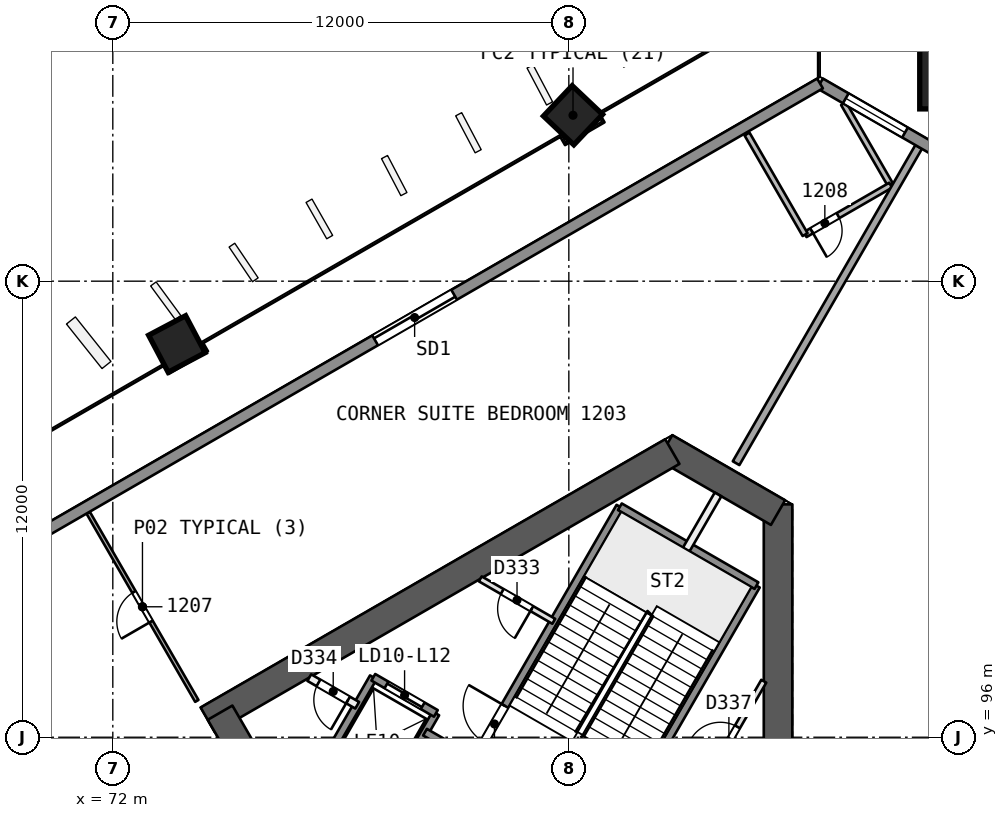
"""IFC4 building model, lengths in metres.
Left out: names, types, materials, properties, quantities, classifications, styles, units other than length and angle.
Written with IfcOpenShell. Run it as: python <this file> out.ifc"""

import sys

from ifc_helpers import new_model, si_unit, direction, frame, frame_2d, origin, origin_2d, place, context, subcontext, project, spatial, rectangle, extrude, element, fill, save


model = new_model("IFC4")
c1 = context("Model", 3, precision=1e-05, world=origin(), true_north=direction((0.0, 1.0)))
c2 = subcontext(c1, "Body", "Model", "MODEL_VIEW")
j1 = project(units=[si_unit("LENGTHUNIT", "METRE"), si_unit("PLANEANGLEUNIT", "RADIAN")], contexts=[c1])
p1 = place(None, origin())
s1 = spatial("IfcSite", under=j1, at=p1, CompositionType="ELEMENT")
p2 = place(p1, origin())
s2 = spatial("IfcBuilding", under=s1, at=p2, CompositionType="ELEMENT")
p3 = place(p2, frame((0.0, 0.0, 57.3)))
s3 = spatial("IfcBuildingStorey", under=s2, at=p3, CompositionType="ELEMENT", Elevation=57.3)
p4 = place(p3, frame((89.505, 88.169, 0.0), z_axis=(0.0, 0.0, 1.0), x_axis=(0.0, 1.0, 0.0)))
e1 = element("IfcWall", 1, at=p4, inside=s3, PredefinedType="SHEAR", context=c2, shape_type="SweptSolid", body=[
    extrude(rectangle(XDim=13.958, YDim=0.75, at=frame_2d((6.979, 0.0))), origin(), (0.0, 0.0, 1.0), 3.7),
])
p5 = place(p3, frame((89.505, 101.911, 0.0), z_axis=(0.0, 0.0, 1.0), x_axis=(-0.866017201164, 0.500014207086, 0.0)))
e2 = element("IfcWall", 2, at=p5, inside=s3, PredefinedType="SHEAR", context=c2, shape_type="SweptSolid", body=[
    extrude(rectangle(XDim=3.429, YDim=0.75, at=frame_2d((1.714, 0.0))), origin(), (0.0, 0.0, 1.0), 3.7),
])
p6 = place(p3, frame((86.723, 103.517, 0.0), z_axis=(0.0, 0.0, 1.0), x_axis=(-0.866020851292, -0.500007885066, 0.0)))
e3 = element("IfcWall", 3, at=p6, inside=s3, PredefinedType="SHEAR", context=c2, shape_type="SweptSolid", body=[
    extrude(rectangle(XDim=14.117, YDim=0.75, at=frame_2d((7.059, 0.0))), origin(), (0.0, 0.0, 1.0), 3.7),
])
p7 = place(p3, frame((74.822, 96.646, 0.0), z_axis=(0.0, 0.0, 1.0), x_axis=(0.499997052475, -0.866027105532, 0.0)))
e4 = element("IfcWall", 4, at=p7, inside=s3, PredefinedType="SHEAR", context=c2, shape_type="SweptSolid", body=[
    extrude(rectangle(XDim=10.005, YDim=0.75, at=frame_2d((5.002, 0.0))), origin(), (0.0, 0.0, 1.0), 3.7),
])
p8 = place(p7, frame((7.855, 0.0, 0.0)))
e5 = element("IfcOpeningElement", 5, at=p8, cuts=e4, PredefinedType="OPENING", context=c2, shape_type="SweptSolid", body=[
    extrude(rectangle(XDim=1.2, YDim=2.1, at=frame_2d((0.6, 1.05))), frame((0.0, 0.385, 0.0), z_axis=(0.0, -1.0, 0.0), x_axis=(1.0, 0.0, 0.0)), (0.0, 0.0, 1.0), 0.771),
])
p9 = place(p3, frame((94.555, 113.87, 0.0), z_axis=(-0.017607001884, -0.030531992032, 0.999378702468), x_axis=(0.866279052578, -0.499560409824, 2.461e-09)))
e6 = element("IfcColumn", 6, at=p9, inside=s3, PredefinedType="COLUMN", context=c2, shape_type="SweptSolid", body=[
    extrude(rectangle(XDim=2.6, YDim=2.6, at=origin_2d()), origin(), (0.0, 0.0, 1.0), 3.702),
])
p10 = place(p3, frame((84.12, 112.399, 0.0), z_axis=(-0.00837646992, -0.028097450282, 0.999570091609), x_axis=(0.86617163682, 0.499292783589, 0.021293469065)))
e7 = element("IfcColumn", 7, at=p10, inside=s3, PredefinedType="COLUMN", context=c2, shape_type="SweptSolid", body=[
    extrude(rectangle(XDim=1.1, YDim=1.1, at=origin_2d()), origin(), (0.0, 0.0, 1.0), 3.702),
])
p11 = place(p3, frame((73.685, 106.375, 0.0), z_axis=(0.000857578916, -0.022824792675, 0.999739112668), x_axis=(0.866060219769, 0.499825848733, 0.01066848966)))
e8 = element("IfcColumn", 8, at=p11, inside=s3, PredefinedType="COLUMN", context=c2, shape_type="SweptSolid", body=[
    extrude(rectangle(XDim=1.1, YDim=1.1, at=origin_2d()), origin(), (0.0, 0.0, 1.0), 3.701),
])
p12 = place(p3, frame((93.205, 111.532, 0.0), z_axis=(0.0, 0.0, 1.0), x_axis=(-0.49998419723, -0.866034527326, 0.0)))
e9 = element("IfcWall", 9, at=p12, inside=s3, PredefinedType="PARTITIONING", context=c2, shape_type="SweptSolid", body=[
    extrude(rectangle(XDim=9.608, YDim=0.2, at=frame_2d((4.804, 0.0))), origin(), (0.0, 0.0, 1.0), 3.2),
])
p13 = place(p3, frame((74.21, 96.956, 0.0), z_axis=(0.0, 0.0, 1.0), x_axis=(-0.499976111731, 0.866039195244, 0.0)))
e10 = element("IfcWall", 10, at=p13, inside=s3, PredefinedType="PARTITIONING", context=c2, shape_type="SweptSolid", body=[
    extrude(rectangle(XDim=5.721, YDim=0.1, at=frame_2d((2.86, 0.0))), origin(), (0.0, 0.0, 1.0), 3.2),
])
p14 = place(p13, frame((2.41, 0.0, 0.0)))
e11 = element("IfcOpeningElement", 11, at=p14, cuts=e10, PredefinedType="OPENING", context=c2, shape_type="SweptSolid", body=[
    extrude(rectangle(XDim=0.9, YDim=2.1, at=frame_2d((0.45, 1.05))), frame((0.0, 0.061, 0.0), z_axis=(0.0, -1.0, 0.0), x_axis=(1.0, 0.0, 0.0)), (0.0, 0.0, 1.0), 0.121),
])
p15 = place(p3, frame((66.22, 98.948, 0.0), z_axis=(0.0, 0.0, 1.0), x_axis=(0.500006802525, -0.866021476309, 0.0)))
e12 = element("IfcWall", 12, at=p15, inside=s3, PredefinedType="PARTITIONING", context=c2, shape_type="SweptSolid", body=[
    extrude(rectangle(XDim=13.7, YDim=0.2, at=frame_2d((6.85, 0.0))), origin(), (0.0, 0.0, 1.0), 3.2),
])
p16 = place(p3, frame((91.229, 112.673, 0.0), z_axis=(0.0, 0.0, 1.0), x_axis=(0.50000366821, -0.866023285932, 0.0)))
e13 = element("IfcWall", 13, at=p16, inside=s3, PredefinedType="PARTITIONING", context=c2, shape_type="SweptSolid", body=[
    extrude(rectangle(XDim=2.48, YDim=0.15, at=frame_2d((1.24, 0.0))), origin(), (0.0, 0.0, 1.0), 3.2),
])
p17 = place(p3, frame((92.469, 110.525, 0.0), z_axis=(0.0, 0.0, 1.0), x_axis=(-0.866062058628, -0.499936506574, 0.0)))
e14 = element("IfcWall", 14, at=p17, inside=s3, PredefinedType="PARTITIONING", context=c2, shape_type="SweptSolid", body=[
    extrude(rectangle(XDim=2.6, YDim=0.15, at=frame_2d((1.3, 0.0))), origin(), (0.0, 0.0, 1.0), 3.2),
])
p18 = place(p17, frame((1.6, 0.0, 0.0)))
e15 = element("IfcOpeningElement", 15, at=p18, cuts=e14, PredefinedType="OPENING", context=c2, shape_type="SweptSolid", body=[
    extrude(rectangle(XDim=0.8, YDim=2.1, at=frame_2d((0.4, 1.05))), frame((0.0, 0.085, 0.0), z_axis=(0.0, -1.0, 0.0), x_axis=(1.0, 0.0, 0.0)), (0.0, 0.0, 1.0), 0.171),
])
p19 = place(p3, frame((90.217, 109.226, 0.0), z_axis=(0.0, 0.0, 1.0), x_axis=(-0.500038109094, 0.866003400371, 0.0)))
e16 = element("IfcWall", 16, at=p19, inside=s3, PredefinedType="PARTITIONING", context=c2, shape_type="SweptSolid", body=[
    extrude(rectangle(XDim=3.057, YDim=0.15, at=frame_2d((1.529, 0.0))), origin(), (0.0, 0.0, 1.0), 3.2),
])
p20 = place(p3, frame((90.61, 113.202, 0.0), z_axis=(0.0, 0.0, 1.0), x_axis=(0.866031251647, -0.499989871069, 0.0)))
e17 = element("IfcWall", 17, at=p20, inside=s3, PredefinedType="SOLIDWALL", context=c2, shape_type="SweptSolid", body=[
    extrude(rectangle(XDim=6.164, YDim=0.3, at=frame_2d((3.082, 0.0))), origin(), (0.0, 0.0, 1.0), 3.2),
])
p21 = place(p20, frame((0.781, 0.0, 0.9)))
e18 = element("IfcOpeningElement", 18, at=p21, cuts=e17, PredefinedType="OPENING", context=c2, shape_type="SweptSolid", body=[
    extrude(rectangle(XDim=1.8, YDim=1.5, at=frame_2d((0.9, 0.75))), frame((0.0, 0.161, 0.0), z_axis=(0.0, -1.0, 0.0), x_axis=(1.0, 0.0, 0.0)), (0.0, 0.0, 1.0), 0.321),
])
p22 = place(p20, frame((3.766, 0.0, 0.9)))
e19 = element("IfcOpeningElement", 19, at=p22, cuts=e17, PredefinedType="OPENING", context=c2, shape_type="SweptSolid", body=[
    extrude(rectangle(XDim=1.8, YDim=1.5, at=frame_2d((0.9, 0.75))), frame((0.0, 0.161, 0.0), z_axis=(0.0, -1.0, 0.0), x_axis=(1.0, 0.0, 0.0)), (0.0, 0.0, 1.0), 0.321),
])
p23 = place(p3, frame((38.441, 83.082, 0.0), z_axis=(0.0, 0.0, 1.0), x_axis=(0.866026578911, 0.499997964616, 0.0)))
e20 = element("IfcWall", 20, at=p23, inside=s3, PredefinedType="SOLIDWALL", context=c2, shape_type="SweptSolid", body=[
    extrude(rectangle(XDim=60.24, YDim=0.3, at=frame_2d((30.12, 0.0))), origin(), (0.0, 0.0, 1.0), 3.2),
])
p24 = place(p23, frame((28.141, 0.0, 0.0)))
e21 = element("IfcOpeningElement", 21, at=p24, cuts=e20, PredefinedType="OPENING", context=c2, shape_type="SweptSolid", body=[
    extrude(rectangle(XDim=2.4, YDim=2.4, at=frame_2d((1.2, 1.2))), frame((0.0, 0.161, 0.0), z_axis=(0.0, -1.0, 0.0), x_axis=(1.0, 0.0, 0.0)), (0.0, 0.0, 1.0), 0.321),
])
p25 = place(p23, frame((33.752, 0.0, 0.0)))
e22 = element("IfcOpeningElement", 22, at=p25, cuts=e20, PredefinedType="OPENING", context=c2, shape_type="SweptSolid", body=[
    extrude(rectangle(XDim=2.4, YDim=2.4, at=frame_2d((1.2, 1.2))), frame((0.0, 0.161, 0.0), z_axis=(0.0, -1.0, 0.0), x_axis=(1.0, 0.0, 0.0)), (0.0, 0.0, 1.0), 0.321),
])
p26 = place(p23, frame((46.722, 0.0, 0.0)))
e23 = element("IfcOpeningElement", 23, at=p26, cuts=e20, PredefinedType="OPENING", context=c2, shape_type="SweptSolid", body=[
    extrude(rectangle(XDim=2.4, YDim=2.4, at=frame_2d((1.2, 1.2))), frame((0.0, 0.161, 0.0), z_axis=(0.0, -1.0, 0.0), x_axis=(1.0, 0.0, 0.0)), (0.0, 0.0, 1.0), 0.321),
])
p27 = place(p23, frame((23.308, 0.0, 0.0)))
e24 = element("IfcOpeningElement", 24, at=p27, cuts=e20, PredefinedType="OPENING", context=c2, shape_type="SweptSolid", body=[
    extrude(rectangle(XDim=2.4, YDim=2.4, at=frame_2d((1.2, 1.2))), frame((0.0, 0.161, 0.0), z_axis=(0.0, -1.0, 0.0), x_axis=(1.0, 0.0, 0.0)), (0.0, 0.0, 1.0), 0.321),
])
p28 = place(p23, frame((11.117, 0.0, 0.0)))
e25 = element("IfcOpeningElement", 25, at=p28, cuts=e20, PredefinedType="OPENING", context=c2, shape_type="SweptSolid", body=[
    extrude(rectangle(XDim=2.4, YDim=2.4, at=frame_2d((1.2, 1.2))), frame((0.0, 0.161, 0.0), z_axis=(0.0, -1.0, 0.0), x_axis=(1.0, 0.0, 0.0)), (0.0, 0.0, 1.0), 0.321),
])
p29 = place(p3, frame((87.321, 94.341, 0.0), z_axis=(0.0, 0.0, 1.0), x_axis=(0.499993116331, 0.866029378036, 0.0)))
e26 = element("IfcWall", 26, at=p29, inside=s3, PredefinedType="PARTITIONING", context=c2, shape_type="SweptSolid", body=[
    extrude(rectangle(XDim=3.618, YDim=0.15, at=frame_2d((1.809, 0.0))), origin(), (0.0, 0.0, 1.0), 3.2),
])
p30 = place(p29, frame((1.332, 0.0, 0.0)))
e27 = element("IfcOpeningElement", 27, at=p30, cuts=e26, PredefinedType="OPENING", context=c2, shape_type="SweptSolid", body=[
    extrude(rectangle(XDim=0.9, YDim=2.1, at=frame_2d((0.45, 1.05))), frame((0.0, 0.085, 0.0), z_axis=(0.0, -1.0, 0.0), x_axis=(1.0, 0.0, 0.0)), (0.0, 0.0, 1.0), 0.171),
])
p31 = place(p3, frame((85.087, 93.321, 0.0), z_axis=(0.0, 0.0, 1.0), x_axis=(0.500019787375, 0.866013979237, 0.0)))
e28 = element("IfcWall", 28, at=p31, inside=s3, PredefinedType="SOLIDWALL", context=c2, shape_type="SweptSolid", body=[
    extrude(rectangle(XDim=7.7, YDim=0.2, at=frame_2d((3.85, 0.0))), origin(), (0.0, 0.0, 1.0), 3.2),
])
p32 = place(p3, frame((87.09, 100.94, 0.0), z_axis=(0.0, 0.0, 1.0), x_axis=(0.499937194881, 0.866061661301, 0.0)))
e29 = element("IfcWall", 29, at=p32, inside=s3, PredefinedType="PARTITIONING", context=c2, shape_type="SweptSolid", body=[
    extrude(rectangle(XDim=1.673, YDim=0.2, at=frame_2d((0.836, 0.0))), origin(), (0.0, 0.0, 1.0), 3.2),
])
p33 = place(p3, frame((81.493, 95.396, 0.0), z_axis=(0.0, 0.0, 1.0), x_axis=(0.500006057782, 0.866021906294, 0.0)))
e30 = element("IfcWall", 30, at=p33, inside=s3, PredefinedType="SOLIDWALL", context=c2, shape_type="SweptSolid", body=[
    extrude(rectangle(XDim=7.7, YDim=0.2, at=frame_2d((3.85, 0.0))), origin(), (0.0, 0.0, 1.0), 3.2),
])
p34 = place(p33, frame((0.55, 0.0, 0.0)))
e31 = element("IfcOpeningElement", 31, at=p34, cuts=e30, PredefinedType="OPENING", context=c2, shape_type="SweptSolid", body=[
    extrude(rectangle(XDim=1.1, YDim=2.1, at=frame_2d((0.55, 1.05))), frame((0.0, 0.11, 0.0), z_axis=(0.0, -1.0, 0.0), x_axis=(1.0, 0.0, 0.0)), (0.0, 0.0, 1.0), 0.221),
])
for number, where, z_axis, x_axis in (
    (32, (78.976, 93.986, 0.0), (0.0, 0.0, 1.0), (0.5, 0.866, 0.0)),
    (33, (77.33, 94.936, 0.0), (0.0, 0.0, 1.0), (0.5, 0.866, 0.0)),
):
    element("IfcWall", number, at=place(p3, frame(where, z_axis=z_axis, x_axis=x_axis)), inside=s3, PredefinedType="SOLIDWALL", context=c2, shape_type="SweptSolid", body=[
        extrude(rectangle(XDim=3.05, YDim=0.2, at=frame_2d((1.525, 0.0))), origin(), (0.0, 0.0, 1.0), 3.2),
    ])
p35 = place(p3, frame((78.43, 96.841, 0.0), z_axis=(0.0, 0.0, 1.0), x_axis=(-0.866045896294, 0.499964504253, 0.0)))
e34 = element("IfcWall", 34, at=p35, inside=s3, PredefinedType="PARTITIONING", context=c2, shape_type="SweptSolid", body=[
    extrude(rectangle(XDim=1.455, YDim=0.2, at=frame_2d((0.728, 0.0))), origin(), (0.0, 0.0, 1.0), 3.2),
])
p36 = place(p35, frame((0.278, 0.0, 0.0)))
e35 = element("IfcOpeningElement", 35, at=p36, cuts=e34, PredefinedType="OPENING", context=c2, shape_type="SweptSolid", body=[
    extrude(rectangle(XDim=0.9, YDim=2.1, at=frame_2d((0.45, 1.05))), frame((0.0, 0.11, 0.0), z_axis=(0.0, -1.0, 0.0), x_axis=(1.0, 0.0, 0.0)), (0.0, 0.0, 1.0), 0.221),
])
p37 = place(p3, frame((88.01, 91.634, 0.0), z_axis=(0.0, 0.0, 1.0), x_axis=(-0.866024315419, 0.5000018851, 0.0)))
e36 = element("IfcWall", 36, at=p37, inside=s3, PredefinedType="SOLIDWALL", context=c2, shape_type="SweptSolid", body=[
    extrude(rectangle(XDim=9.0, YDim=0.2, at=frame_2d((4.5, 0.0))), origin(), (0.0, 0.0, 1.0), 3.2),
])
p38 = place(p3, frame((80.5, 96.627, 0.0), z_axis=(0.0, 0.0, 1.0), x_axis=(-0.86601224135, 0.500022797313, 0.0)))
e37 = element("IfcWall", 37, at=p38, inside=s3, PredefinedType="SOLIDWALL", context=c2, shape_type="SweptSolid", body=[
    extrude(rectangle(XDim=1.9, YDim=0.2, at=frame_2d((0.95, 0.0))), origin(), (0.0, 0.0, 1.0), 3.2),
])
p39 = place(p38, frame((0.4, 0.0, 0.0)))
e38 = element("IfcOpeningElement", 38, at=p39, cuts=e37, PredefinedType="OPENING", context=c2, shape_type="SweptSolid", body=[
    extrude(rectangle(XDim=1.1, YDim=2.1, at=frame_2d((0.55, 1.05))), frame((0.0, 0.11, 0.0), z_axis=(0.0, -1.0, 0.0), x_axis=(1.0, 0.0, 0.0)), (0.0, 0.0, 1.0), 0.221),
])
p40 = place(p3, frame((83.603, 99.051, 0.0), z_axis=(0.0, 0.0, 1.0), x_axis=(-0.866047162388, 0.499962311098, 0.0)))
e39 = element("IfcWall", 39, at=p40, inside=s3, PredefinedType="PARTITIONING", context=c2, shape_type="SweptSolid", body=[
    extrude(rectangle(XDim=2.232, YDim=0.15, at=frame_2d((1.116, 0.0))), origin(), (0.0, 0.0, 1.0), 3.2),
])
p41 = place(p40, frame((0.666, 0.0, 0.0)))
e40 = element("IfcOpeningElement", 40, at=p41, cuts=e39, PredefinedType="OPENING", context=c2, shape_type="SweptSolid", body=[
    extrude(rectangle(XDim=0.9, YDim=2.1, at=frame_2d((0.45, 1.05))), frame((0.0, 0.085, 0.0), z_axis=(0.0, -1.0, 0.0), x_axis=(1.0, 0.0, 0.0)), (0.0, 0.0, 1.0), 0.171),
])
p42 = place(p3, frame((88.937, 99.99, 0.0), z_axis=(0.0, 0.0, 1.0), x_axis=(-0.866004344652, 0.500036473714, 0.0)))
e41 = element("IfcWall", 41, at=p42, inside=s3, PredefinedType="SOLIDWALL", context=c2, shape_type="SweptSolid", body=[
    extrude(rectangle(XDim=4.15, YDim=0.2, at=frame_2d((2.075, 0.0))), origin(), (0.0, 0.0, 1.0), 3.2),
])
p43 = place(p14, origin())
e42 = element("IfcDoor", 42, at=p43, inside=s3, OperationType="SINGLE_SWING_LEFT", PredefinedType="NOTDEFINED", context=c2, shape_type="SweptSolid", body=[
    extrude(rectangle(XDim=0.9, YDim=2.1, at=frame_2d((0.45, 1.05))), frame((0.0, 0.025, 0.0), z_axis=(0.0, -1.0, 0.0), x_axis=(1.0, 0.0, 0.0)), (0.0, 0.0, 1.0), 0.05),
])
fill(e11, e42)
p44 = place(p18, origin())
e43 = element("IfcDoor", 43, at=p44, inside=s3, OperationType="SINGLE_SWING_RIGHT", PredefinedType="NOTDEFINED", context=c2, shape_type="SweptSolid", body=[
    extrude(rectangle(XDim=0.8, YDim=2.1, at=frame_2d((0.4, 1.05))), frame((0.0, 0.025, 0.0), z_axis=(0.0, -1.0, 0.0), x_axis=(1.0, 0.0, 0.0)), (0.0, 0.0, 1.0), 0.05),
])
fill(e15, e43)
p45 = place(p21, origin())
e44 = element("IfcWindow", 44, at=p45, inside=s3, PartitioningType="SINGLE_PANEL", PredefinedType="WINDOW", context=c2, shape_type="SweptSolid", body=[
    extrude(rectangle(XDim=1.8, YDim=1.5, at=frame_2d((0.9, 0.75))), frame((0.0, 0.03, 0.0), z_axis=(0.0, -1.0, 0.0), x_axis=(1.0, 0.0, 0.0)), (0.0, 0.0, 1.0), 0.06),
])
fill(e18, e44)
p46 = place(p26, origin())
e45 = element("IfcDoor", 45, at=p46, inside=s3, OperationType="SLIDING_TO_LEFT", PredefinedType="NOTDEFINED", context=c2, shape_type="SweptSolid", body=[
    extrude(rectangle(XDim=2.4, YDim=2.4, at=frame_2d((1.2, 1.2))), frame((0.0, 0.025, 0.0), z_axis=(0.0, -1.0, 0.0), x_axis=(1.0, 0.0, 0.0)), (0.0, 0.0, 1.0), 0.05),
])
fill(e23, e45)
p47 = place(p39, origin())
e46 = element("IfcDoor", 46, at=p47, inside=s3, OperationType="SLIDING_TO_RIGHT", PredefinedType="NOTDEFINED", context=c2, shape_type="SweptSolid", body=[
    extrude(rectangle(XDim=1.1, YDim=2.1, at=frame_2d((0.55, 1.05))), frame((0.0, 0.025, 0.0), z_axis=(0.0, -1.0, 0.0), x_axis=(1.0, 0.0, 0.0)), (0.0, 0.0, 1.0), 0.05),
])
fill(e38, e46)
p48 = place(p41, origin())
e47 = element("IfcDoor", 47, at=p48, inside=s3, OperationType="SINGLE_SWING_LEFT", PredefinedType="NOTDEFINED", context=c2, shape_type="SweptSolid", body=[
    extrude(rectangle(XDim=0.9, YDim=2.1, at=frame_2d((0.45, 1.05))), frame((0.0, 0.025, 0.0), z_axis=(0.0, -1.0, 0.0), x_axis=(1.0, 0.0, 0.0)), (0.0, 0.0, 1.0), 0.05),
])
fill(e40, e47)
p49 = place(p36, origin())
e48 = element("IfcDoor", 48, at=p49, inside=s3, OperationType="SINGLE_SWING_LEFT", PredefinedType="NOTDEFINED", context=c2, shape_type="SweptSolid", body=[
    extrude(rectangle(XDim=0.9, YDim=2.1, at=frame_2d((0.45, 1.05))), frame((0.0, 0.025, 0.0), z_axis=(0.0, -1.0, 0.0), x_axis=(1.0, 0.0, 0.0)), (0.0, 0.0, 1.0), 0.05),
])
fill(e35, e48)
p50 = place(p34, origin())
e49 = element("IfcDoor", 49, at=p50, inside=s3, OperationType="SINGLE_SWING_RIGHT", PredefinedType="NOTDEFINED", context=c2, shape_type="SweptSolid", body=[
    extrude(rectangle(XDim=1.1, YDim=2.1, at=frame_2d((0.55, 1.05))), frame((0.0, 0.025, 0.0), z_axis=(0.0, -1.0, 0.0), x_axis=(1.0, 0.0, 0.0)), (0.0, 0.0, 1.0), 0.05),
])
fill(e31, e49)
p51 = place(p30, origin())
e50 = element("IfcDoor", 50, at=p51, inside=s3, OperationType="SINGLE_SWING_LEFT", PredefinedType="NOTDEFINED", context=c2, shape_type="SweptSolid", body=[
    extrude(rectangle(XDim=0.9, YDim=2.1, at=frame_2d((0.45, 1.05))), frame((0.0, 0.025, 0.0), z_axis=(0.0, -1.0, 0.0), x_axis=(1.0, 0.0, 0.0)), (0.0, 0.0, 1.0), 0.05),
])
fill(e27, e50)
save(model, sys.argv[1])
